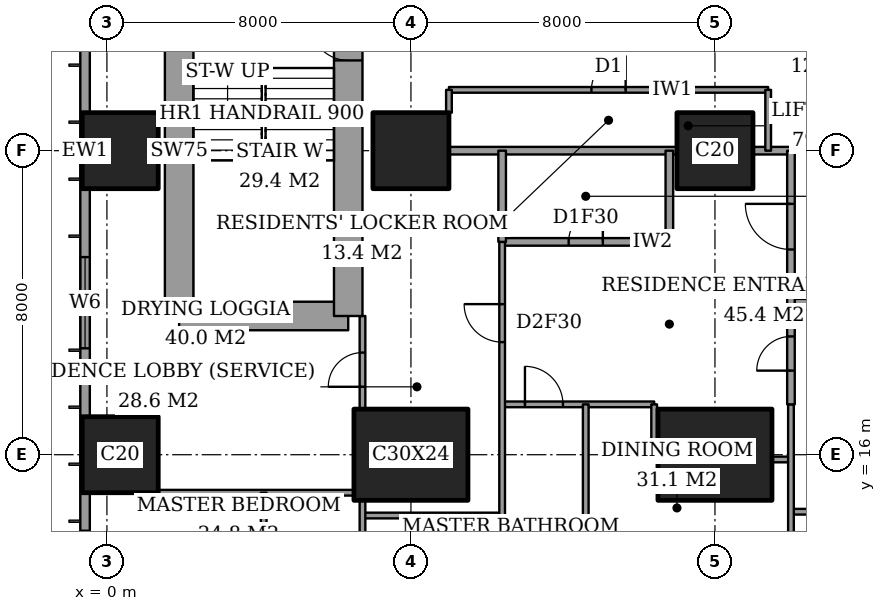
"""IFC4 building model, lengths in metres.
Left out: names, types, materials, properties, quantities, classifications, styles, units other than length and angle.
Written with IfcOpenShell. Run it as: python <this file> out.ifc"""

import sys

from ifc_helpers import new_model, si_unit, direction, frame, frame_2d, origin, origin_2d, place, context, subcontext, project, spatial, rectangle, extrude, element, fill, save


model = new_model("IFC4")
c1 = context("Model", 3, precision=1e-05, world=origin(), true_north=direction((0.0, 1.0)))
c2 = subcontext(c1, "Body", "Model", "MODEL_VIEW")
j1 = project(units=[si_unit("LENGTHUNIT", "METRE"), si_unit("PLANEANGLEUNIT", "RADIAN")], contexts=[c1])
p1 = place(None, origin())
s1 = spatial("IfcSite", under=j1, at=p1, CompositionType="ELEMENT")
p2 = place(p1, origin())
s2 = spatial("IfcBuilding", under=s1, at=p2, CompositionType="ELEMENT")
p3 = place(p2, frame((0.0, 0.0, 29.6)))
s3 = spatial("IfcBuildingStorey", under=s2, at=p3, CompositionType="ELEMENT", Elevation=29.6)
for number, where, z_axis, x_axis in (
    (1, (0.35, 16.0, 0.0), (0.0, 0.0, 1.0), (1.0, 0.0, 0.0)),
    (2, (0.35, 24.0, 0.0), (0.0, 0.0, 1.0), (1.0, 0.0, 0.0)),
):
    element("IfcColumn", number, at=place(p3, frame(where, z_axis=z_axis, x_axis=x_axis)), inside=s3, PredefinedType="COLUMN", context=c2, shape_type="SweptSolid", body=[
        extrude(rectangle(XDim=2.0, YDim=2.0, at=origin_2d()), origin(), (0.0, 0.0, 1.0), 3.6),
    ])
p4 = place(p3, frame((8.0, 16.0, 0.0), z_axis=(0.0, 0.0, 1.0), x_axis=(1.0, 0.0, 0.0)))
e3 = element("IfcColumn", 3, at=p4, inside=s3, PredefinedType="COLUMN", context=c2, shape_type="SweptSolid", body=[
    extrude(rectangle(XDim=3.0, YDim=2.4, at=origin_2d()), origin(), (0.0, 0.0, 1.0), 3.6),
])
p5 = place(p3, frame((8.0, 24.0, 0.0), z_axis=(0.0, 0.0, 1.0), x_axis=(1.0, 0.0, 0.0)))
e4 = element("IfcColumn", 4, at=p5, inside=s3, PredefinedType="COLUMN", context=c2, shape_type="SweptSolid", body=[
    extrude(rectangle(XDim=2.0, YDim=2.0, at=origin_2d()), origin(), (0.0, 0.0, 1.0), 3.6),
])
p6 = place(p3, frame((16.0, 16.0, 0.0), z_axis=(0.0, 0.0, 1.0), x_axis=(1.0, 0.0, 0.0)))
e5 = element("IfcColumn", 5, at=p6, inside=s3, PredefinedType="COLUMN", context=c2, shape_type="SweptSolid", body=[
    extrude(rectangle(XDim=3.0, YDim=2.4, at=origin_2d()), origin(), (0.0, 0.0, 1.0), 3.6),
])
p7 = place(p3, frame((16.0, 24.0, 0.0), z_axis=(0.0, 0.0, 1.0), x_axis=(1.0, 0.0, 0.0)))
e6 = element("IfcColumn", 6, at=p7, inside=s3, PredefinedType="COLUMN", context=c2, shape_type="SweptSolid", body=[
    extrude(rectangle(XDim=2.0, YDim=2.0, at=origin_2d()), origin(), (0.0, 0.0, 1.0), 3.6),
])
p8 = place(p3, frame((1.9, 19.65, 0.0), z_axis=(0.0, 0.0, 1.0), x_axis=(1.0, 0.0, 0.0)))
e7 = element("IfcWall", 7, at=p8, inside=s3, PredefinedType="SHEAR", context=c2, shape_type="SweptSolid", body=[
    extrude(rectangle(XDim=4.45, YDim=0.75, at=frame_2d((2.225, 0.0))), origin(), (0.0, 0.0, 1.0), 3.6),
])
p9 = place(p3, frame((6.35, 19.65, 0.0), z_axis=(0.0, 0.0, 1.0), x_axis=(0.0, 1.0, 0.0)))
e8 = element("IfcWall", 8, at=p9, inside=s3, PredefinedType="SHEAR", context=c2, shape_type="SweptSolid", body=[
    extrude(rectangle(XDim=8.7, YDim=0.75, at=frame_2d((4.35, 0.0))), origin(), (0.0, 0.0, 1.0), 3.6),
])
p10 = place(p9, frame((6.725, 0.0, 0.0)))
e9 = element("IfcOpeningElement", 9, at=p10, cuts=e8, PredefinedType="OPENING", context=c2, shape_type="SweptSolid", body=[
    extrude(rectangle(XDim=1.0, YDim=2.1, at=frame_2d((0.5, 1.05))), frame((0.0, 0.385, 0.0), z_axis=(0.0, -1.0, 0.0), x_axis=(1.0, 0.0, 0.0)), (0.0, 0.0, 1.0), 0.77),
])
p11 = place(p3, frame((1.9, 28.35, 0.0), z_axis=(0.0, 0.0, 1.0), x_axis=(0.0, -1.0, 0.0)))
e10 = element("IfcWall", 10, at=p11, inside=s3, PredefinedType="SHEAR", context=c2, shape_type="SweptSolid", body=[
    extrude(rectangle(XDim=8.7, YDim=0.75, at=frame_2d((4.35, 0.0))), origin(), (0.0, 0.0, 1.0), 3.6),
])
p12 = place(p3, frame((-0.575, 44.825, 0.0), z_axis=(0.0, 0.0, 1.0), x_axis=(0.0, -1.0, 0.0)))
e11 = element("IfcWall", 11, at=p12, inside=s3, PredefinedType="SOLIDWALL", context=c2, shape_type="SweptSolid", body=[
    extrude(rectangle(XDim=41.65, YDim=0.25, at=frame_2d((20.825, 0.0))), origin(), (0.0, 0.0, 1.0), 3.6),
])
p13 = place(p12, frame((0.775, 0.0, 0.6)))
e12 = element("IfcOpeningElement", 12, at=p13, cuts=e11, PredefinedType="OPENING", context=c2, shape_type="SweptSolid", body=[
    extrude(rectangle(XDim=2.4, YDim=2.0, at=frame_2d((1.2, 1.0))), frame((0.0, 0.135, 0.0), z_axis=(0.0, -1.0, 0.0), x_axis=(1.0, 0.0, 0.0)), (0.0, 0.0, 1.0), 0.27),
])
p14 = place(p12, frame((6.225, 0.0, 0.6)))
e13 = element("IfcOpeningElement", 13, at=p14, cuts=e11, PredefinedType="OPENING", context=c2, shape_type="SweptSolid", body=[
    extrude(rectangle(XDim=1.2, YDim=2.0, at=frame_2d((0.6, 1.0))), frame((0.0, 0.135, 0.0), z_axis=(0.0, -1.0, 0.0), x_axis=(1.0, 0.0, 0.0)), (0.0, 0.0, 1.0), 0.27),
])
p15 = place(p12, frame((8.625, 0.0, 0.6)))
e14 = element("IfcOpeningElement", 14, at=p15, cuts=e11, PredefinedType="OPENING", context=c2, shape_type="SweptSolid", body=[
    extrude(rectangle(XDim=2.4, YDim=2.0, at=frame_2d((1.2, 1.0))), frame((0.0, 0.135, 0.0), z_axis=(0.0, -1.0, 0.0), x_axis=(1.0, 0.0, 0.0)), (0.0, 0.0, 1.0), 0.27),
])
p16 = place(p12, frame((15.625, 0.0, 0.6)))
e15 = element("IfcOpeningElement", 15, at=p16, cuts=e11, PredefinedType="OPENING", context=c2, shape_type="SweptSolid", body=[
    extrude(rectangle(XDim=2.4, YDim=2.0, at=frame_2d((1.2, 1.0))), frame((0.0, 0.135, 0.0), z_axis=(0.0, -1.0, 0.0), x_axis=(1.0, 0.0, 0.0)), (0.0, 0.0, 1.0), 0.27),
])
p17 = place(p12, frame((23.625, 0.0, 0.6)))
e16 = element("IfcOpeningElement", 16, at=p17, cuts=e11, PredefinedType="OPENING", context=c2, shape_type="SweptSolid", body=[
    extrude(rectangle(XDim=2.4, YDim=2.0, at=frame_2d((1.2, 1.0))), frame((0.0, 0.135, 0.0), z_axis=(0.0, -1.0, 0.0), x_axis=(1.0, 0.0, 0.0)), (0.0, 0.0, 1.0), 0.27),
])
p18 = place(p12, frame((30.825, 0.0, 0.6)))
e17 = element("IfcOpeningElement", 17, at=p18, cuts=e11, PredefinedType="OPENING", context=c2, shape_type="SweptSolid", body=[
    extrude(rectangle(XDim=2.4, YDim=2.0, at=frame_2d((1.2, 1.0))), frame((0.0, 0.135, 0.0), z_axis=(0.0, -1.0, 0.0), x_axis=(1.0, 0.0, 0.0)), (0.0, 0.0, 1.0), 0.27),
])
p19 = place(p12, frame((34.5, 0.0, 0.6)))
e18 = element("IfcOpeningElement", 18, at=p19, cuts=e11, PredefinedType="OPENING", context=c2, shape_type="SweptSolid", body=[
    extrude(rectangle(XDim=1.2, YDim=2.0, at=frame_2d((0.6, 1.0))), frame((0.0, 0.135, 0.0), z_axis=(0.0, -1.0, 0.0), x_axis=(1.0, 0.0, 0.0)), (0.0, 0.0, 1.0), 0.27),
])
p20 = place(p12, frame((38.475, 0.0, 0.6)))
e19 = element("IfcOpeningElement", 19, at=p20, cuts=e11, PredefinedType="OPENING", context=c2, shape_type="SweptSolid", body=[
    extrude(rectangle(XDim=2.4, YDim=2.0, at=frame_2d((1.2, 1.0))), frame((0.0, 0.135, 0.0), z_axis=(0.0, -1.0, 0.0), x_axis=(1.0, 0.0, 0.0)), (0.0, 0.0, 1.0), 0.27),
])
p21 = place(p3, frame((6.725, 14.4, 0.0), z_axis=(0.0, 0.0, 1.0), x_axis=(1.0, 0.0, 0.0)))
e20 = element("IfcWall", 20, at=p21, inside=s3, PredefinedType="PARTITIONING", context=c2, shape_type="SweptSolid", body=[
    extrude(rectangle(XDim=3.675, YDim=0.15, at=frame_2d((1.837, 0.0))), origin(), (0.0, 0.0, 1.0), 3.35),
])
p22 = place(p3, frame((18.0, 14.5, 0.0), z_axis=(0.0, 0.0, 1.0), x_axis=(1.0, 0.0, 0.0)))
e21 = element("IfcWall", 21, at=p22, inside=s3, PredefinedType="PARTITIONING", context=c2, shape_type="SweptSolid", body=[
    extrude(rectangle(XDim=6.0, YDim=0.15, at=frame_2d((3.0, 0.0))), origin(), (0.0, 0.0, 1.0), 3.35),
])
p23 = place(p3, frame((1.35, 15.0, 0.0), z_axis=(0.0, 0.0, 1.0), x_axis=(1.0, 0.0, 0.0)))
e22 = element("IfcWall", 22, at=p23, inside=s3, PredefinedType="PARTITIONING", context=c2, shape_type="SweptSolid", body=[
    extrude(rectangle(XDim=5.15, YDim=0.15, at=frame_2d((2.575, 0.0))), origin(), (0.0, 0.0, 1.0), 3.35),
])
p24 = place(p3, frame((17.5, 15.875, 0.0), z_axis=(0.0, 0.0, 1.0), x_axis=(1.0, 0.0, 0.0)))
e23 = element("IfcWall", 23, at=p24, inside=s3, PredefinedType="PARTITIONING", context=c2, shape_type="SweptSolid", body=[
    extrude(rectangle(XDim=0.5, YDim=0.15, at=frame_2d((0.25, 0.0))), origin(), (0.0, 0.0, 1.0), 2.634),
])
p25 = place(p3, frame((10.4, 17.325, 0.0), z_axis=(0.0, 0.0, 1.0), x_axis=(1.0, 0.0, 0.0)))
e24 = element("IfcWall", 24, at=p25, inside=s3, PredefinedType="PARTITIONING", context=c2, shape_type="SweptSolid", body=[
    extrude(rectangle(XDim=4.0, YDim=0.15, at=frame_2d((2.0, 0.0))), origin(), (0.0, 0.0, 1.0), 3.35),
])
p26 = place(p25, frame((0.6, 0.0, 0.0)))
e25 = element("IfcOpeningElement", 25, at=p26, cuts=e24, PredefinedType="OPENING", context=c2, shape_type="SweptSolid", body=[
    extrude(rectangle(XDim=1.0, YDim=2.1, at=frame_2d((0.5, 1.05))), frame((0.0, 0.085, 0.0), z_axis=(0.0, -1.0, 0.0), x_axis=(1.0, 0.0, 0.0)), (0.0, 0.0, 1.0), 0.17),
])
p27 = place(p3, frame((18.0, 20.0, 0.0), z_axis=(0.0, 0.0, 1.0), x_axis=(1.0, 0.0, 0.0)))
e26 = element("IfcWall", 26, at=p27, inside=s3, PredefinedType="PARTITIONING", context=c2, shape_type="SweptSolid", body=[
    extrude(rectangle(XDim=6.0, YDim=0.2, at=frame_2d((3.0, 0.0))), origin(), (0.0, 0.0, 1.0), 3.35),
])
p28 = place(p3, frame((10.4, 21.6, 0.0), z_axis=(0.0, 0.0, 1.0), x_axis=(1.0, 0.0, 0.0)))
e27 = element("IfcWall", 27, at=p28, inside=s3, PredefinedType="PARTITIONING", context=c2, shape_type="SweptSolid", body=[
    extrude(rectangle(XDim=4.4, YDim=0.2, at=frame_2d((2.2, 0.0))), origin(), (0.0, 0.0, 1.0), 3.35),
])
p29 = place(p28, frame((1.75, 0.0, 0.0)))
e28 = element("IfcOpeningElement", 28, at=p29, cuts=e27, PredefinedType="OPENING", context=c2, shape_type="SweptSolid", body=[
    extrude(rectangle(XDim=0.9, YDim=2.1, at=frame_2d((0.45, 1.05))), frame((0.0, 0.11, 0.0), z_axis=(0.0, -1.0, 0.0), x_axis=(1.0, 0.0, 0.0)), (0.0, 0.0, 1.0), 0.22),
])
p30 = place(p3, frame((9.0, 24.0, 0.0), z_axis=(0.0, 0.0, 1.0), x_axis=(1.0, 0.0, 0.0)))
e29 = element("IfcWall", 29, at=p30, inside=s3, PredefinedType="PARTITIONING", context=c2, shape_type="SweptSolid", body=[
    extrude(rectangle(XDim=6.0, YDim=0.2, at=frame_2d((3.0, 0.0))), origin(), (0.0, 0.0, 1.0), 3.35),
])
p31 = place(p3, frame((17.0, 24.0, 0.0), z_axis=(0.0, 0.0, 1.0), x_axis=(1.0, 0.0, 0.0)))
e30 = element("IfcWall", 30, at=p31, inside=s3, PredefinedType="PARTITIONING", context=c2, shape_type="SweptSolid", body=[
    extrude(rectangle(XDim=1.0, YDim=0.2, at=frame_2d((0.5, 0.0))), origin(), (0.0, 0.0, 1.0), 3.35),
])
p32 = place(p3, frame((9.0, 25.6, 0.0), z_axis=(0.0, 0.0, 1.0), x_axis=(1.0, 0.0, 0.0)))
e31 = element("IfcWall", 31, at=p32, inside=s3, PredefinedType="PARTITIONING", context=c2, shape_type="SweptSolid", body=[
    extrude(rectangle(XDim=8.4, YDim=0.15, at=frame_2d((4.2, 0.0))), origin(), (0.0, 0.0, 1.0), 3.35),
])
p33 = place(p32, frame((3.75, 0.0, 0.0)))
e32 = element("IfcOpeningElement", 32, at=p33, cuts=e31, PredefinedType="OPENING", context=c2, shape_type="SweptSolid", body=[
    extrude(rectangle(XDim=0.9, YDim=2.1, at=frame_2d((0.45, 1.05))), frame((0.0, 0.085, 0.0), z_axis=(0.0, -1.0, 0.0), x_axis=(1.0, 0.0, 0.0)), (0.0, 0.0, 1.0), 0.17),
])
p34 = place(p3, frame((4.125, 12.4, 0.0), z_axis=(0.0, 0.0, 1.0), x_axis=(0.0, 1.0, 0.0)))
e33 = element("IfcWall", 33, at=p34, inside=s3, PredefinedType="PARTITIONING", context=c2, shape_type="SweptSolid", body=[
    extrude(rectangle(XDim=2.6, YDim=0.15, at=frame_2d((1.3, 0.0))), origin(), (0.0, 0.0, 1.0), 3.35),
])
p35 = place(p3, frame((6.725, 10.6, 0.0), z_axis=(0.0, 0.0, 1.0), x_axis=(0.0, 1.0, 0.0)))
e34 = element("IfcWall", 34, at=p35, inside=s3, PredefinedType="PARTITIONING", context=c2, shape_type="SweptSolid", body=[
    extrude(rectangle(XDim=4.2, YDim=0.15, at=frame_2d((2.1, 0.0))), origin(), (0.0, 0.0, 1.0), 3.35),
])
p36 = place(p3, frame((6.725, 17.2, 0.0), z_axis=(0.0, 0.0, 1.0), x_axis=(0.0, 1.0, 0.0)))
e35 = element("IfcWall", 35, at=p36, inside=s3, PredefinedType="PARTITIONING", context=c2, shape_type="SweptSolid", body=[
    extrude(rectangle(XDim=2.45, YDim=0.15, at=frame_2d((1.225, 0.0))), origin(), (0.0, 0.0, 1.0), 3.35),
])
p37 = place(p36, frame((0.587, 0.0, 0.0)))
e36 = element("IfcOpeningElement", 36, at=p37, cuts=e35, PredefinedType="OPENING", context=c2, shape_type="SweptSolid", body=[
    extrude(rectangle(XDim=0.9, YDim=2.1, at=frame_2d((0.45, 1.05))), frame((0.0, 0.085, 0.0), z_axis=(0.0, -1.0, 0.0), x_axis=(1.0, 0.0, 0.0)), (0.0, 0.0, 1.0), 0.17),
])
p38 = place(p3, frame((9.0, 25.0, 0.0), z_axis=(0.0, 0.0, 1.0), x_axis=(0.0, 1.0, 0.0)))
e37 = element("IfcWall", 37, at=p38, inside=s3, PredefinedType="PARTITIONING", context=c2, shape_type="SweptSolid", body=[
    extrude(rectangle(XDim=0.6, YDim=0.15, at=frame_2d((0.3, 0.0))), origin(), (0.0, 0.0, 1.0), 3.35),
])
p39 = place(p3, frame((10.4, 21.6, 0.0), z_axis=(0.0, 0.0, 1.0), x_axis=(0.0, 1.0, 0.0)))
e38 = element("IfcWall", 38, at=p39, inside=s3, PredefinedType="PARTITIONING", context=c2, shape_type="SweptSolid", body=[
    extrude(rectangle(XDim=2.4, YDim=0.2, at=frame_2d((1.2, 0.0))), origin(), (0.0, 0.0, 1.0), 3.35),
])
p40 = place(p3, frame((10.4, 10.6, 0.0), z_axis=(0.0, 0.0, 1.0), x_axis=(0.0, 1.0, 0.0)))
e39 = element("IfcWall", 39, at=p40, inside=s3, PredefinedType="PARTITIONING", context=c2, shape_type="SweptSolid", body=[
    extrude(rectangle(XDim=11.0, YDim=0.15, at=frame_2d((5.5, 0.0))), origin(), (0.0, 0.0, 1.0), 3.35),
])
p41 = place(p40, frame((8.363, 0.0, 0.0)))
e40 = element("IfcOpeningElement", 40, at=p41, cuts=e39, PredefinedType="OPENING", context=c2, shape_type="SweptSolid", body=[
    extrude(rectangle(XDim=1.0, YDim=2.1, at=frame_2d((0.5, 1.05))), frame((0.0, 0.085, 0.0), z_axis=(0.0, -1.0, 0.0), x_axis=(1.0, 0.0, 0.0)), (0.0, 0.0, 1.0), 0.17),
])
p42 = place(p3, frame((12.6, 10.6, 0.0), z_axis=(0.0, 0.0, 1.0), x_axis=(0.0, 1.0, 0.0)))
e41 = element("IfcWall", 41, at=p42, inside=s3, PredefinedType="PARTITIONING", context=c2, shape_type="SweptSolid", body=[
    extrude(rectangle(XDim=6.725, YDim=0.15, at=frame_2d((3.362, 0.0))), origin(), (0.0, 0.0, 1.0), 3.35),
])
p43 = place(p3, frame((14.4, 15.875, 0.0), z_axis=(0.0, 0.0, 1.0), x_axis=(0.0, 1.0, 0.0)))
e42 = element("IfcWall", 42, at=p43, inside=s3, PredefinedType="PARTITIONING", context=c2, shape_type="SweptSolid", body=[
    extrude(rectangle(XDim=1.45, YDim=0.15, at=frame_2d((0.725, 0.0))), origin(), (0.0, 0.0, 1.0), 3.35),
])
p44 = place(p3, frame((14.8, 21.6, 0.0), z_axis=(0.0, 0.0, 1.0), x_axis=(0.0, 1.0, 0.0)))
e43 = element("IfcWall", 43, at=p44, inside=s3, PredefinedType="PARTITIONING", context=c2, shape_type="SweptSolid", body=[
    extrude(rectangle(XDim=2.4, YDim=0.2, at=frame_2d((1.2, 0.0))), origin(), (0.0, 0.0, 1.0), 3.35),
])
p45 = place(p3, frame((17.4, 24.0, 0.0), z_axis=(0.0, 0.0, 1.0), x_axis=(0.0, 1.0, 0.0)))
e44 = element("IfcWall", 44, at=p45, inside=s3, PredefinedType="PARTITIONING", context=c2, shape_type="SweptSolid", body=[
    extrude(rectangle(XDim=1.6, YDim=0.15, at=frame_2d((0.8, 0.0))), origin(), (0.0, 0.0, 1.0), 3.35),
])
p46 = place(p3, frame((18.0, 17.325, 0.0), z_axis=(0.0, 0.0, 1.0), x_axis=(0.0, 1.0, 0.0)))
e45 = element("IfcWall", 45, at=p46, inside=s3, PredefinedType="PARTITIONING", context=c2, shape_type="SweptSolid", body=[
    extrude(rectangle(XDim=6.675, YDim=0.2, at=frame_2d((3.337, 0.0))), origin(), (0.0, 0.0, 1.0), 3.35),
])
p47 = place(p46, frame((4.075, 0.0, 0.0)))
e46 = element("IfcOpeningElement", 46, at=p47, cuts=e45, PredefinedType="OPENING", context=c2, shape_type="SweptSolid", body=[
    extrude(rectangle(XDim=1.2, YDim=2.4, at=frame_2d((0.6, 1.2))), frame((0.0, 0.11, 0.0), z_axis=(0.0, -1.0, 0.0), x_axis=(1.0, 0.0, 0.0)), (0.0, 0.0, 1.0), 0.22),
])
p48 = place(p46, frame((0.887, 0.0, 0.0)))
e47 = element("IfcOpeningElement", 47, at=p48, cuts=e45, PredefinedType="OPENING", context=c2, shape_type="SweptSolid", body=[
    extrude(rectangle(XDim=0.9, YDim=2.1, at=frame_2d((0.45, 1.05))), frame((0.0, 0.11, 0.0), z_axis=(0.0, -1.0, 0.0), x_axis=(1.0, 0.0, 0.0)), (0.0, 0.0, 1.0), 0.22),
])
p49 = place(p3, frame((18.0, 10.6, 0.0), z_axis=(0.0, 0.0, 1.0), x_axis=(0.0, 1.0, 0.0)))
e48 = element("IfcWall", 48, at=p49, inside=s3, PredefinedType="PARTITIONING", context=c2, shape_type="SweptSolid", body=[
    extrude(rectangle(XDim=6.725, YDim=0.15, at=frame_2d((3.362, 0.0))), origin(), (0.0, 0.0, 1.0), 3.35),
])
p50 = place(p17, origin())
e49 = element("IfcWindow", 49, at=p50, inside=s3, PartitioningType="SINGLE_PANEL", PredefinedType="WINDOW", context=c2, shape_type="SweptSolid", body=[
    extrude(rectangle(XDim=2.4, YDim=2.0, at=frame_2d((1.2, 1.0))), frame((0.0, 0.03, 0.0), z_axis=(0.0, -1.0, 0.0), x_axis=(1.0, 0.0, 0.0)), (0.0, 0.0, 1.0), 0.06),
])
fill(e16, e49)
p51 = place(p37, origin())
e50 = element("IfcDoor", 50, at=p51, inside=s3, OperationType="SINGLE_SWING_RIGHT", PredefinedType="DOOR", context=c2, shape_type="SweptSolid", body=[
    extrude(rectangle(XDim=0.9, YDim=2.1, at=frame_2d((0.45, 1.05))), frame((0.0, 0.025, 0.0), z_axis=(0.0, -1.0, 0.0), x_axis=(1.0, 0.0, 0.0)), (0.0, 0.0, 1.0), 0.05),
])
fill(e36, e50)
p52 = place(p41, origin())
e51 = element("IfcDoor", 51, at=p52, inside=s3, OperationType="SINGLE_SWING_LEFT", PredefinedType="DOOR", context=c2, shape_type="SweptSolid", body=[
    extrude(rectangle(XDim=1.0, YDim=2.1, at=frame_2d((0.5, 1.05))), frame((0.0, 0.025, 0.0), z_axis=(0.0, -1.0, 0.0), x_axis=(1.0, 0.0, 0.0)), (0.0, 0.0, 1.0), 0.05),
])
fill(e40, e51)
p53 = place(p29, origin())
e52 = element("IfcDoor", 52, at=p53, inside=s3, OperationType="SINGLE_SWING_LEFT", PredefinedType="DOOR", context=c2, shape_type="SweptSolid", body=[
    extrude(rectangle(XDim=0.9, YDim=2.1, at=frame_2d((0.45, 1.05))), frame((0.0, 0.025, 0.0), z_axis=(0.0, -1.0, 0.0), x_axis=(1.0, 0.0, 0.0)), (0.0, 0.0, 1.0), 0.05),
])
fill(e28, e52)
p54 = place(p47, origin())
e53 = element("IfcDoor", 53, at=p54, inside=s3, OperationType="SINGLE_SWING_LEFT", PredefinedType="DOOR", context=c2, shape_type="SweptSolid", body=[
    extrude(rectangle(XDim=1.2, YDim=2.4, at=frame_2d((0.6, 1.2))), frame((0.0, 0.025, 0.0), z_axis=(0.0, -1.0, 0.0), x_axis=(1.0, 0.0, 0.0)), (0.0, 0.0, 1.0), 0.05),
])
fill(e46, e53)
p55 = place(p26, origin())
e54 = element("IfcDoor", 54, at=p55, inside=s3, OperationType="SINGLE_SWING_RIGHT", PredefinedType="DOOR", context=c2, shape_type="SweptSolid", body=[
    extrude(rectangle(XDim=1.0, YDim=2.1, at=frame_2d((0.5, 1.05))), frame((0.0, 0.025, 0.0), z_axis=(0.0, -1.0, 0.0), x_axis=(1.0, 0.0, 0.0)), (0.0, 0.0, 1.0), 0.05),
])
fill(e25, e54)
p56 = place(p48, origin())
e55 = element("IfcDoor", 55, at=p56, inside=s3, OperationType="SINGLE_SWING_RIGHT", PredefinedType="DOOR", context=c2, shape_type="SweptSolid", body=[
    extrude(rectangle(XDim=0.9, YDim=2.1, at=frame_2d((0.45, 1.05))), frame((0.0, 0.025, 0.0), z_axis=(0.0, -1.0, 0.0), x_axis=(1.0, 0.0, 0.0)), (0.0, 0.0, 1.0), 0.05),
])
fill(e47, e55)
p57 = place(p33, origin())
e56 = element("IfcDoor", 56, at=p57, inside=s3, OperationType="SINGLE_SWING_LEFT", PredefinedType="DOOR", context=c2, shape_type="SweptSolid", body=[
    extrude(rectangle(XDim=0.9, YDim=2.1, at=frame_2d((0.45, 1.05))), frame((0.0, 0.025, 0.0), z_axis=(0.0, -1.0, 0.0), x_axis=(1.0, 0.0, 0.0)), (0.0, 0.0, 1.0), 0.05),
])
fill(e32, e56)
p58 = place(p10, origin())
e57 = element("IfcDoor", 57, at=p58, inside=s3, OperationType="SINGLE_SWING_LEFT", PredefinedType="DOOR", context=c2, shape_type="SweptSolid", body=[
    extrude(rectangle(XDim=1.0, YDim=2.1, at=frame_2d((0.5, 1.05))), frame((0.0, 0.025, 0.0), z_axis=(0.0, -1.0, 0.0), x_axis=(1.0, 0.0, 0.0)), (0.0, 0.0, 1.0), 0.05),
])
fill(e9, e57)
save(model, sys.argv[1])
